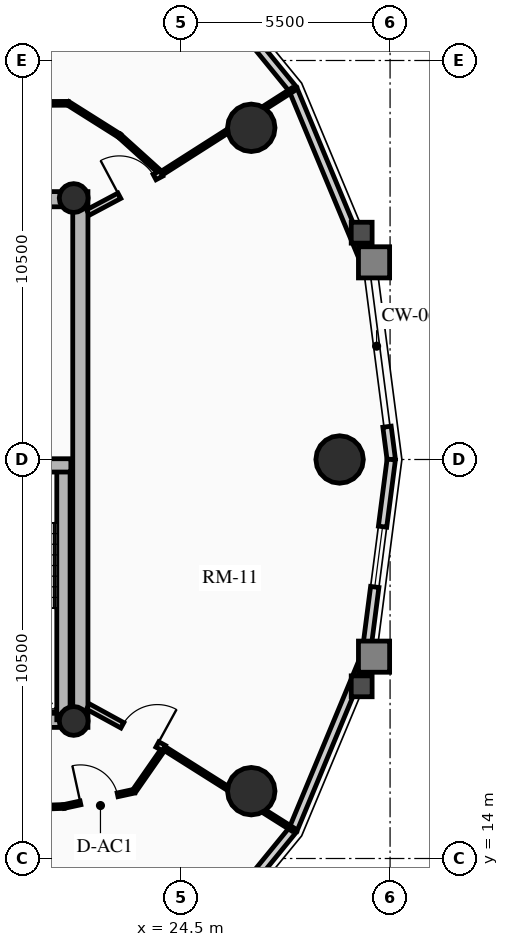
"""IFC4 building model, lengths in metres.
Left out: names, types, materials, properties, quantities, classifications, styles, units other than length and angle.
Written with IfcOpenShell. Run it as: python <this file> out.ifc"""

import sys

from ifc_helpers import new_model, si_unit, direction, frame, frame_2d, origin, origin_2d, place, context, subcontext, project, spatial, rectangle, circle, hollow_circle, extrude, source, transform, mapped, element, fill, save


model = new_model("IFC4")
c1 = context("Model", 3, precision=1e-05, world=origin(), true_north=direction((0.0, 1.0)))
c2 = subcontext(c1, "Body", "Model", "MODEL_VIEW")
j1 = project(units=[si_unit("LENGTHUNIT", "METRE"), si_unit("PLANEANGLEUNIT", "RADIAN")], contexts=[c1])
p1 = place(None, origin())
s1 = spatial("IfcSite", under=j1, at=p1, CompositionType="ELEMENT")
p2 = place(p1, origin())
s2 = spatial("IfcBuilding", under=s1, at=p2, CompositionType="ELEMENT")
p3 = place(p2, frame((0.0, 0.0, 186.52)))
s3 = spatial("IfcBuildingStorey", under=s2, at=p3, CompositionType="ELEMENT", Elevation=186.52)
p4 = place(p3, frame((21.85, 17.45, 0.0), z_axis=(0.0, 0.0, 1.0), x_axis=(0.0, 1.0, 0.0)))
e1 = element("IfcWall", 1, at=p4, inside=s3, PredefinedType="SHEAR", context=c2, shape_type="SweptSolid", body=[
    extrude(rectangle(XDim=14.1, YDim=0.4, at=frame_2d((7.05, 0.0))), origin(), (0.0, 0.0, 1.0), 2.91),
])
p5 = place(p3, frame((11.15, 17.65, 0.0), z_axis=(0.0, 0.0, 1.0), x_axis=(1.0, 0.0, 0.0)))
e2 = element("IfcWall", 2, at=p5, inside=s3, PredefinedType="SHEAR", context=c2, shape_type="SweptSolid", body=[
    extrude(rectangle(XDim=10.7, YDim=0.4, at=frame_2d((5.35, 0.0))), origin(), (0.0, 0.0, 1.0), 2.91),
])
m1 = source(origin(), c2, "Body", "SweptSolid", [
    extrude(rectangle(XDim=1.5, YDim=2.02, at=frame_2d((0.75, 1.01))), frame((0.0, 0.21, 0.0), z_axis=(0.0, -1.0, 0.0), x_axis=(1.0, 0.0, 0.0)), (0.0, 0.0, 1.0), 0.42),
])
p6 = place(p5, frame((5.45, 0.0, 0.0)))
e3 = element("IfcOpeningElement", 3, at=p6, cuts=e2, PredefinedType="OPENING", context=c2, shape_type="MappedRepresentation", body=[
    mapped(m1, transform((0.0, 0.0, 0.0), x_axis=(1.0, 0.0, 0.0), y_axis=(0.0, 1.0, 0.0), z_axis=(0.0, 0.0, 1.0), scale=1.0)),
])
p7 = place(p3, frame((11.15, 31.35, 0.0), z_axis=(0.0, 0.0, 1.0), x_axis=(1.0, 0.0, 0.0)))
e4 = element("IfcWall", 4, at=p7, inside=s3, PredefinedType="SHEAR", context=c2, shape_type="SweptSolid", body=[
    extrude(rectangle(XDim=10.7, YDim=0.4, at=frame_2d((5.35, 0.0))), origin(), (0.0, 0.0, 1.0), 2.91),
])
p8 = place(p7, frame((4.6, 0.0, 0.0)))
e5 = element("IfcOpeningElement", 5, at=p8, cuts=e4, PredefinedType="OPENING", context=c2, shape_type="MappedRepresentation", body=[
    mapped(m1, transform((0.0, 0.0, 0.0), x_axis=(1.0, 0.0, 0.0), y_axis=(0.0, 1.0, 0.0), z_axis=(0.0, 0.0, 1.0), scale=1.0)),
])
p9 = place(p3, frame((21.405, 17.65, 0.0), z_axis=(0.0, 0.0, 1.0), x_axis=(0.0, 1.0, 0.0)))
e6 = element("IfcWall", 6, at=p9, inside=s3, PredefinedType="SHEAR", context=c2, shape_type="SweptSolid", body=[
    extrude(rectangle(XDim=6.695, YDim=0.35, at=frame_2d((3.348, 0.0))), origin(), (0.0, 0.0, 1.0), 2.91),
])
p10 = place(p3, frame((18.315, 24.345, 0.0), z_axis=(0.0, 0.0, 1.0), x_axis=(1.0, 0.0, 0.0)))
e7 = element("IfcWall", 7, at=p10, inside=s3, PredefinedType="SHEAR", context=c2, shape_type="SweptSolid", body=[
    extrude(rectangle(XDim=3.285, YDim=0.35, at=frame_2d((1.643, 0.0))), origin(), (0.0, 0.0, 1.0), 2.91),
])
for number, where, z_axis, x_axis in (
    (8, (21.675, 17.62, 0.0), (0.0, 0.0, 1.0), (1.0, 0.0, 0.0)),
    (9, (21.675, 31.38, 0.0), (0.0, 0.0, 1.0), (1.0, 0.0, 0.0)),
):
    element("IfcColumn", number, at=place(p3, frame(where, z_axis=z_axis, x_axis=x_axis)), inside=s3, PredefinedType="COLUMN", context=c2, shape_type="SweptSolid", body=[
        extrude(hollow_circle(Radius=0.38, WallThickness=0.032, at=origin_2d()), origin(), (0.0, 0.0, 1.0), 2.91),
    ])
for number, where, z_axis, x_axis in (
    (10, (28.672, 24.5, 0.0), (0.0, 0.0, 1.0), (1.0, 0.0, 0.0)),
    (11, (26.347, 33.229, 0.0), (0.0, 0.0, 1.0), (1.0, 0.0, 0.0)),
    (12, (26.347, 15.771, 0.0), (0.0, 0.0, 1.0), (1.0, 0.0, 0.0)),
):
    element("IfcColumn", number, at=place(p3, frame(where, z_axis=z_axis, x_axis=x_axis)), inside=s3, PredefinedType="USERDEFINED", context=c2, shape_type="SweptSolid", body=[
        extrude(circle(Radius=0.625, at=origin_2d()), origin(), (0.0, 0.0, 1.0), 2.91),
    ])
p11 = place(p3, frame((29.919, 25.363, 0.0), z_axis=(0.0, 0.0, 1.0), x_axis=(0.128247365719, -0.991742211054, 0.0)))
e13 = element("IfcWall", 13, at=p11, inside=s3, PredefinedType="SOLIDWALL", context=c2, shape_type="SweptSolid", body=[
    extrude(rectangle(XDim=0.87, YDim=0.22, at=frame_2d((0.435, 0.0))), origin(), (0.0, 0.0, 1.0), 2.675),
])
p12 = place(p3, frame((27.447, 34.24, 0.0), z_axis=(0.0, 0.0, 1.0), x_axis=(0.384144094086, -0.923273152961, 0.0)))
e14 = element("IfcWall", 14, at=p12, inside=s3, PredefinedType="SOLIDWALL", context=c2, shape_type="SweptSolid", body=[
    extrude(rectangle(XDim=5.003, YDim=0.22, at=frame_2d((2.501, 0.0))), origin(), (0.0, 0.0, 1.0), 2.245),
])
p13 = place(p3, frame((24.453, 37.906, 0.0), z_axis=(0.0, 0.0, 1.0), x_axis=(0.632470615287, -0.774584353572, 0.0)))
e15 = element("IfcWall", 15, at=p13, inside=s3, PredefinedType="SOLIDWALL", context=c2, shape_type="SweptSolid", body=[
    extrude(rectangle(XDim=4.733, YDim=0.22, at=frame_2d((2.366, 0.0))), origin(), (0.0, 0.0, 1.0), 2.245),
])
m2 = source(origin(), c2, "Body", "SweptSolid", [
    extrude(rectangle(XDim=1.6, YDim=1.3, at=frame_2d((0.8, 0.65))), frame((0.0, 0.12, 0.0), z_axis=(0.0, -1.0, 0.0), x_axis=(1.0, 0.0, 0.0)), (0.0, 0.0, 1.0), 0.24),
])
p14 = place(p13, frame((1.566, 0.0, 0.65)))
e16 = element("IfcOpeningElement", 16, at=p14, cuts=e15, PredefinedType="OPENING", context=c2, shape_type="MappedRepresentation", body=[
    mapped(m2, transform((0.0, 0.0, 0.0), x_axis=(1.0, 0.0, 0.0), y_axis=(0.0, 1.0, 0.0), z_axis=(0.0, 0.0, 1.0), scale=1.0)),
])
p15 = place(p3, frame((27.447, 14.76, 0.0), z_axis=(0.0, 0.0, 1.0), x_axis=(-0.632470615287, -0.774584353572, 0.0)))
e17 = element("IfcWall", 17, at=p15, inside=s3, PredefinedType="SOLIDWALL", context=c2, shape_type="SweptSolid", body=[
    extrude(rectangle(XDim=4.733, YDim=0.22, at=frame_2d((2.366, 0.0))), origin(), (0.0, 0.0, 1.0), 2.245),
])
p16 = place(p15, frame((1.566, 0.0, 0.65)))
e18 = element("IfcOpeningElement", 18, at=p16, cuts=e17, PredefinedType="OPENING", context=c2, shape_type="MappedRepresentation", body=[
    mapped(m2, transform((0.0, 0.0, 0.0), x_axis=(1.0, 0.0, 0.0), y_axis=(0.0, 1.0, 0.0), z_axis=(0.0, 0.0, 1.0), scale=1.0)),
])
p17 = place(p3, frame((29.369, 19.38, 0.0), z_axis=(0.0, 0.0, 1.0), x_axis=(-0.384144094086, -0.923273152961, 0.0)))
e19 = element("IfcWall", 19, at=p17, inside=s3, PredefinedType="SOLIDWALL", context=c2, shape_type="SweptSolid", body=[
    extrude(rectangle(XDim=5.003, YDim=0.22, at=frame_2d((2.501, 0.0))), origin(), (0.0, 0.0, 1.0), 2.245),
])
p18 = place(p3, frame((30.031, 24.5, 0.0), z_axis=(0.0, 0.0, 1.0), x_axis=(-0.128287912609, -0.991736966881, 0.0)))
e20 = element("IfcWall", 20, at=p18, inside=s3, PredefinedType="SOLIDWALL", context=c2, shape_type="SweptSolid", body=[
    extrude(rectangle(XDim=5.163, YDim=0.22, at=frame_2d((2.582, 0.0))), origin(), (0.0, 0.0, 1.0), 2.245),
])
p19 = place(p18, frame((1.782, 0.0, 0.65)))
e21 = element("IfcOpeningElement", 21, at=p19, cuts=e20, PredefinedType="OPENING", context=c2, shape_type="MappedRepresentation", body=[
    mapped(m2, transform((0.0, 0.0, 0.0), x_axis=(1.0, 0.0, 0.0), y_axis=(0.0, 1.0, 0.0), z_axis=(0.0, 0.0, 1.0), scale=1.0)),
])
p20 = place(p3, frame((23.98, 32.027, 0.0), z_axis=(0.0, 0.0, 1.0), x_axis=(-0.742353224332, 0.670008724065, 0.0)))
e22 = element("IfcWall", 22, at=p20, inside=s3, PredefinedType="MOVABLE", context=c2, shape_type="SweptSolid", body=[
    extrude(rectangle(XDim=1.485, YDim=0.1, at=frame_2d((0.742, 0.0))), origin(), (0.0, 0.0, 1.0), 2.245),
])
p21 = place(p3, frame((22.877, 33.022, 0.0), z_axis=(0.0, 0.0, 1.0), x_axis=(-0.845895608855, 0.533348496689, 0.0)))
e23 = element("IfcWall", 23, at=p21, inside=s3, PredefinedType="MOVABLE", context=c2, shape_type="SweptSolid", body=[
    extrude(rectangle(XDim=1.597, YDim=0.1, at=frame_2d((0.798, 0.0))), origin(), (0.0, 0.0, 1.0), 2.245),
])
p22 = place(p3, frame((21.527, 33.873, 0.0), z_axis=(0.0, 0.0, 1.0), x_axis=(-0.999991838845, -0.004040079574, 0.0)))
e24 = element("IfcWall", 24, at=p22, inside=s3, PredefinedType="MOVABLE", context=c2, shape_type="SweptSolid", body=[
    extrude(rectangle(XDim=3.384, YDim=0.1, at=frame_2d((1.692, 0.0))), origin(), (0.0, 0.0, 1.0), 2.245),
])
p23 = place(p3, frame((14.781, 15.141, 0.0), z_axis=(0.0, 0.0, 1.0), x_axis=(0.999407918707, 0.034406569513, 0.0)))
e25 = element("IfcWall", 25, at=p23, inside=s3, PredefinedType="MOVABLE", context=c2, shape_type="SweptSolid", body=[
    extrude(rectangle(XDim=6.642, YDim=0.1, at=frame_2d((3.321, 0.0))), origin(), (0.0, 0.0, 1.0), 2.245),
])
p24 = place(p3, frame((21.419, 15.369, 0.0), z_axis=(0.0, 0.0, 1.0), x_axis=(0.977192701953, 0.212354475464, 0.0)))
e26 = element("IfcWall", 26, at=p24, inside=s3, PredefinedType="MOVABLE", context=c2, shape_type="SweptSolid", body=[
    extrude(rectangle(XDim=1.888, YDim=0.1, at=frame_2d((0.944, 0.0))), origin(), (0.0, 0.0, 1.0), 2.245),
])
m3 = source(origin(), c2, "Body", "SweptSolid", [
    extrude(rectangle(XDim=1.0, YDim=2.015, at=frame_2d((0.5, 1.007))), frame((0.0, 0.06, 0.0), z_axis=(0.0, -1.0, 0.0), x_axis=(1.0, 0.0, 0.0)), (0.0, 0.0, 1.0), 0.12),
])
p25 = place(p24, frame((0.444, 0.0, 0.0)))
e27 = element("IfcOpeningElement", 27, at=p25, cuts=e26, PredefinedType="OPENING", context=c2, shape_type="MappedRepresentation", body=[
    mapped(m3, transform((0.0, 0.0, 0.0), x_axis=(1.0, 0.0, 0.0), y_axis=(0.0, 1.0, 0.0), z_axis=(0.0, 0.0, 1.0), scale=1.0)),
])
p26 = place(p3, frame((23.263, 15.77, 0.0), z_axis=(0.0, 0.0, 1.0), x_axis=(0.570743456919, 0.821128434768, 0.0)))
e28 = element("IfcWall", 28, at=p26, inside=s3, PredefinedType="MOVABLE", context=c2, shape_type="SweptSolid", body=[
    extrude(rectangle(XDim=1.382, YDim=0.1, at=frame_2d((0.691, 0.0))), origin(), (0.0, 0.0, 1.0), 2.245),
])
p27 = place(p3, frame((23.98, 32.027, 0.0), z_axis=(0.0, 0.0, 1.0), x_axis=(0.843120722145, 0.53772432332, 0.0)))
e29 = element("IfcWall", 29, at=p27, inside=s3, PredefinedType="MOVABLE", context=c2, shape_type="SweptSolid", body=[
    extrude(rectangle(XDim=4.093, YDim=0.1, at=frame_2d((2.046, 0.0))), origin(), (0.0, 0.0, 1.0), 2.245),
])
p28 = place(p3, frame((24.052, 16.905, 0.0), z_axis=(0.0, 0.0, 1.0), x_axis=(0.845666007609, -0.533712472755, 0.0)))
e30 = element("IfcWall", 30, at=p28, inside=s3, PredefinedType="MOVABLE", context=c2, shape_type="SweptSolid", body=[
    extrude(rectangle(XDim=3.995, YDim=0.1, at=frame_2d((1.998, 0.0))), origin(), (0.0, 0.0, 1.0), 2.245),
])
p29 = place(p3, frame((22.05, 31.0, 0.0), z_axis=(0.0, 0.0, 1.0), x_axis=(0.882791584709, 0.469764853908, 0.0)))
e31 = element("IfcWall", 31, at=p29, inside=s3, PredefinedType="PARTITIONING", context=c2, shape_type="SweptSolid", body=[
    extrude(rectangle(XDim=2.186, YDim=0.16, at=frame_2d((1.093, 0.0))), origin(), (0.0, 0.0, 1.0), 2.245),
])
m4 = source(origin(), c2, "Body", "SweptSolid", [
    extrude(rectangle(XDim=1.05, YDim=2.015, at=frame_2d((0.525, 1.007))), frame((0.0, 0.09, 0.0), z_axis=(0.0, -1.0, 0.0), x_axis=(1.0, 0.0, 0.0)), (0.0, 0.0, 1.0), 0.18),
])
p30 = place(p29, frame((0.936, 0.0, 0.0)))
e32 = element("IfcOpeningElement", 32, at=p30, cuts=e31, PredefinedType="OPENING", context=c2, shape_type="MappedRepresentation", body=[
    mapped(m4, transform((0.0, 0.0, 0.0), x_axis=(1.0, 0.0, 0.0), y_axis=(0.0, 1.0, 0.0), z_axis=(0.0, 0.0, 1.0), scale=1.0)),
])
p31 = place(p3, frame((22.05, 18.0, 0.0), z_axis=(0.0, 0.0, 1.0), x_axis=(0.877252891813, -0.480028503118, 0.0)))
e33 = element("IfcWall", 33, at=p31, inside=s3, PredefinedType="PARTITIONING", context=c2, shape_type="SweptSolid", body=[
    extrude(rectangle(XDim=2.282, YDim=0.16, at=frame_2d((1.141, 0.0))), origin(), (0.0, 0.0, 1.0), 2.245),
])
p32 = place(p31, frame((1.032, 0.0, 0.0)))
e34 = element("IfcOpeningElement", 34, at=p32, cuts=e33, PredefinedType="OPENING", context=c2, shape_type="MappedRepresentation", body=[
    mapped(m4, transform((0.0, 0.0, 0.0), x_axis=(1.0, 0.0, 0.0), y_axis=(0.0, 1.0, 0.0), z_axis=(0.0, 0.0, 1.0), scale=1.0)),
])
m5 = source(origin(), c2, "Body", "SweptSolid", [
    extrude(rectangle(XDim=1.6, YDim=1.3, at=frame_2d((0.8, 0.65))), frame((0.0, 0.03, 0.0), z_axis=(0.0, -1.0, 0.0), x_axis=(1.0, 0.0, 0.0)), (0.0, 0.0, 1.0), 0.06),
])
p33 = place(p19, origin())
e35 = element("IfcWindow", 35, at=p33, inside=s3, PartitioningType="SINGLE_PANEL", PredefinedType="WINDOW", context=c2, shape_type="MappedRepresentation", body=[
    mapped(m5, transform((0.0, 0.0, 0.0), x_axis=(1.0, 0.0, 0.0), y_axis=(0.0, 1.0, 0.0), z_axis=(0.0, 0.0, 1.0), scale=1.0)),
])
fill(e21, e35)
m6 = source(origin(), c2, "Body", "SweptSolid", [
    extrude(rectangle(XDim=1.05, YDim=2.015, at=frame_2d((0.525, 1.007))), frame((0.0, 0.025, 0.0), z_axis=(0.0, -1.0, 0.0), x_axis=(1.0, 0.0, 0.0)), (0.0, 0.0, 1.0), 0.05),
])
p34 = place(p30, origin())
e36 = element("IfcDoor", 36, at=p34, inside=s3, OperationType="SINGLE_SWING_LEFT", PredefinedType="DOOR", context=c2, shape_type="MappedRepresentation", body=[
    mapped(m6, transform((0.0, 0.0, 0.0), x_axis=(1.0, 0.0, 0.0), y_axis=(0.0, 1.0, 0.0), z_axis=(0.0, 0.0, 1.0), scale=1.0)),
])
fill(e32, e36)
p35 = place(p32, origin())
e37 = element("IfcDoor", 37, at=p35, inside=s3, OperationType="SINGLE_SWING_RIGHT", PredefinedType="DOOR", context=c2, shape_type="MappedRepresentation", body=[
    mapped(m6, transform((0.0, 0.0, 0.0), x_axis=(1.0, 0.0, 0.0), y_axis=(0.0, 1.0, 0.0), z_axis=(0.0, 0.0, 1.0), scale=1.0)),
])
fill(e34, e37)
m7 = source(origin(), c2, "Body", "SweptSolid", [
    extrude(rectangle(XDim=1.0, YDim=2.015, at=frame_2d((0.5, 1.007))), frame((0.0, 0.025, 0.0), z_axis=(0.0, -1.0, 0.0), x_axis=(1.0, 0.0, 0.0)), (0.0, 0.0, 1.0), 0.05),
])
p36 = place(p25, origin())
e38 = element("IfcDoor", 38, at=p36, inside=s3, OperationType="SINGLE_SWING_LEFT", PredefinedType="DOOR", context=c2, shape_type="MappedRepresentation", body=[
    mapped(m7, transform((0.0, 0.0, 0.0), x_axis=(1.0, 0.0, 0.0), y_axis=(0.0, 1.0, 0.0), z_axis=(0.0, 0.0, 1.0), scale=1.0)),
])
fill(e27, e38)
save(model, sys.argv[1])
